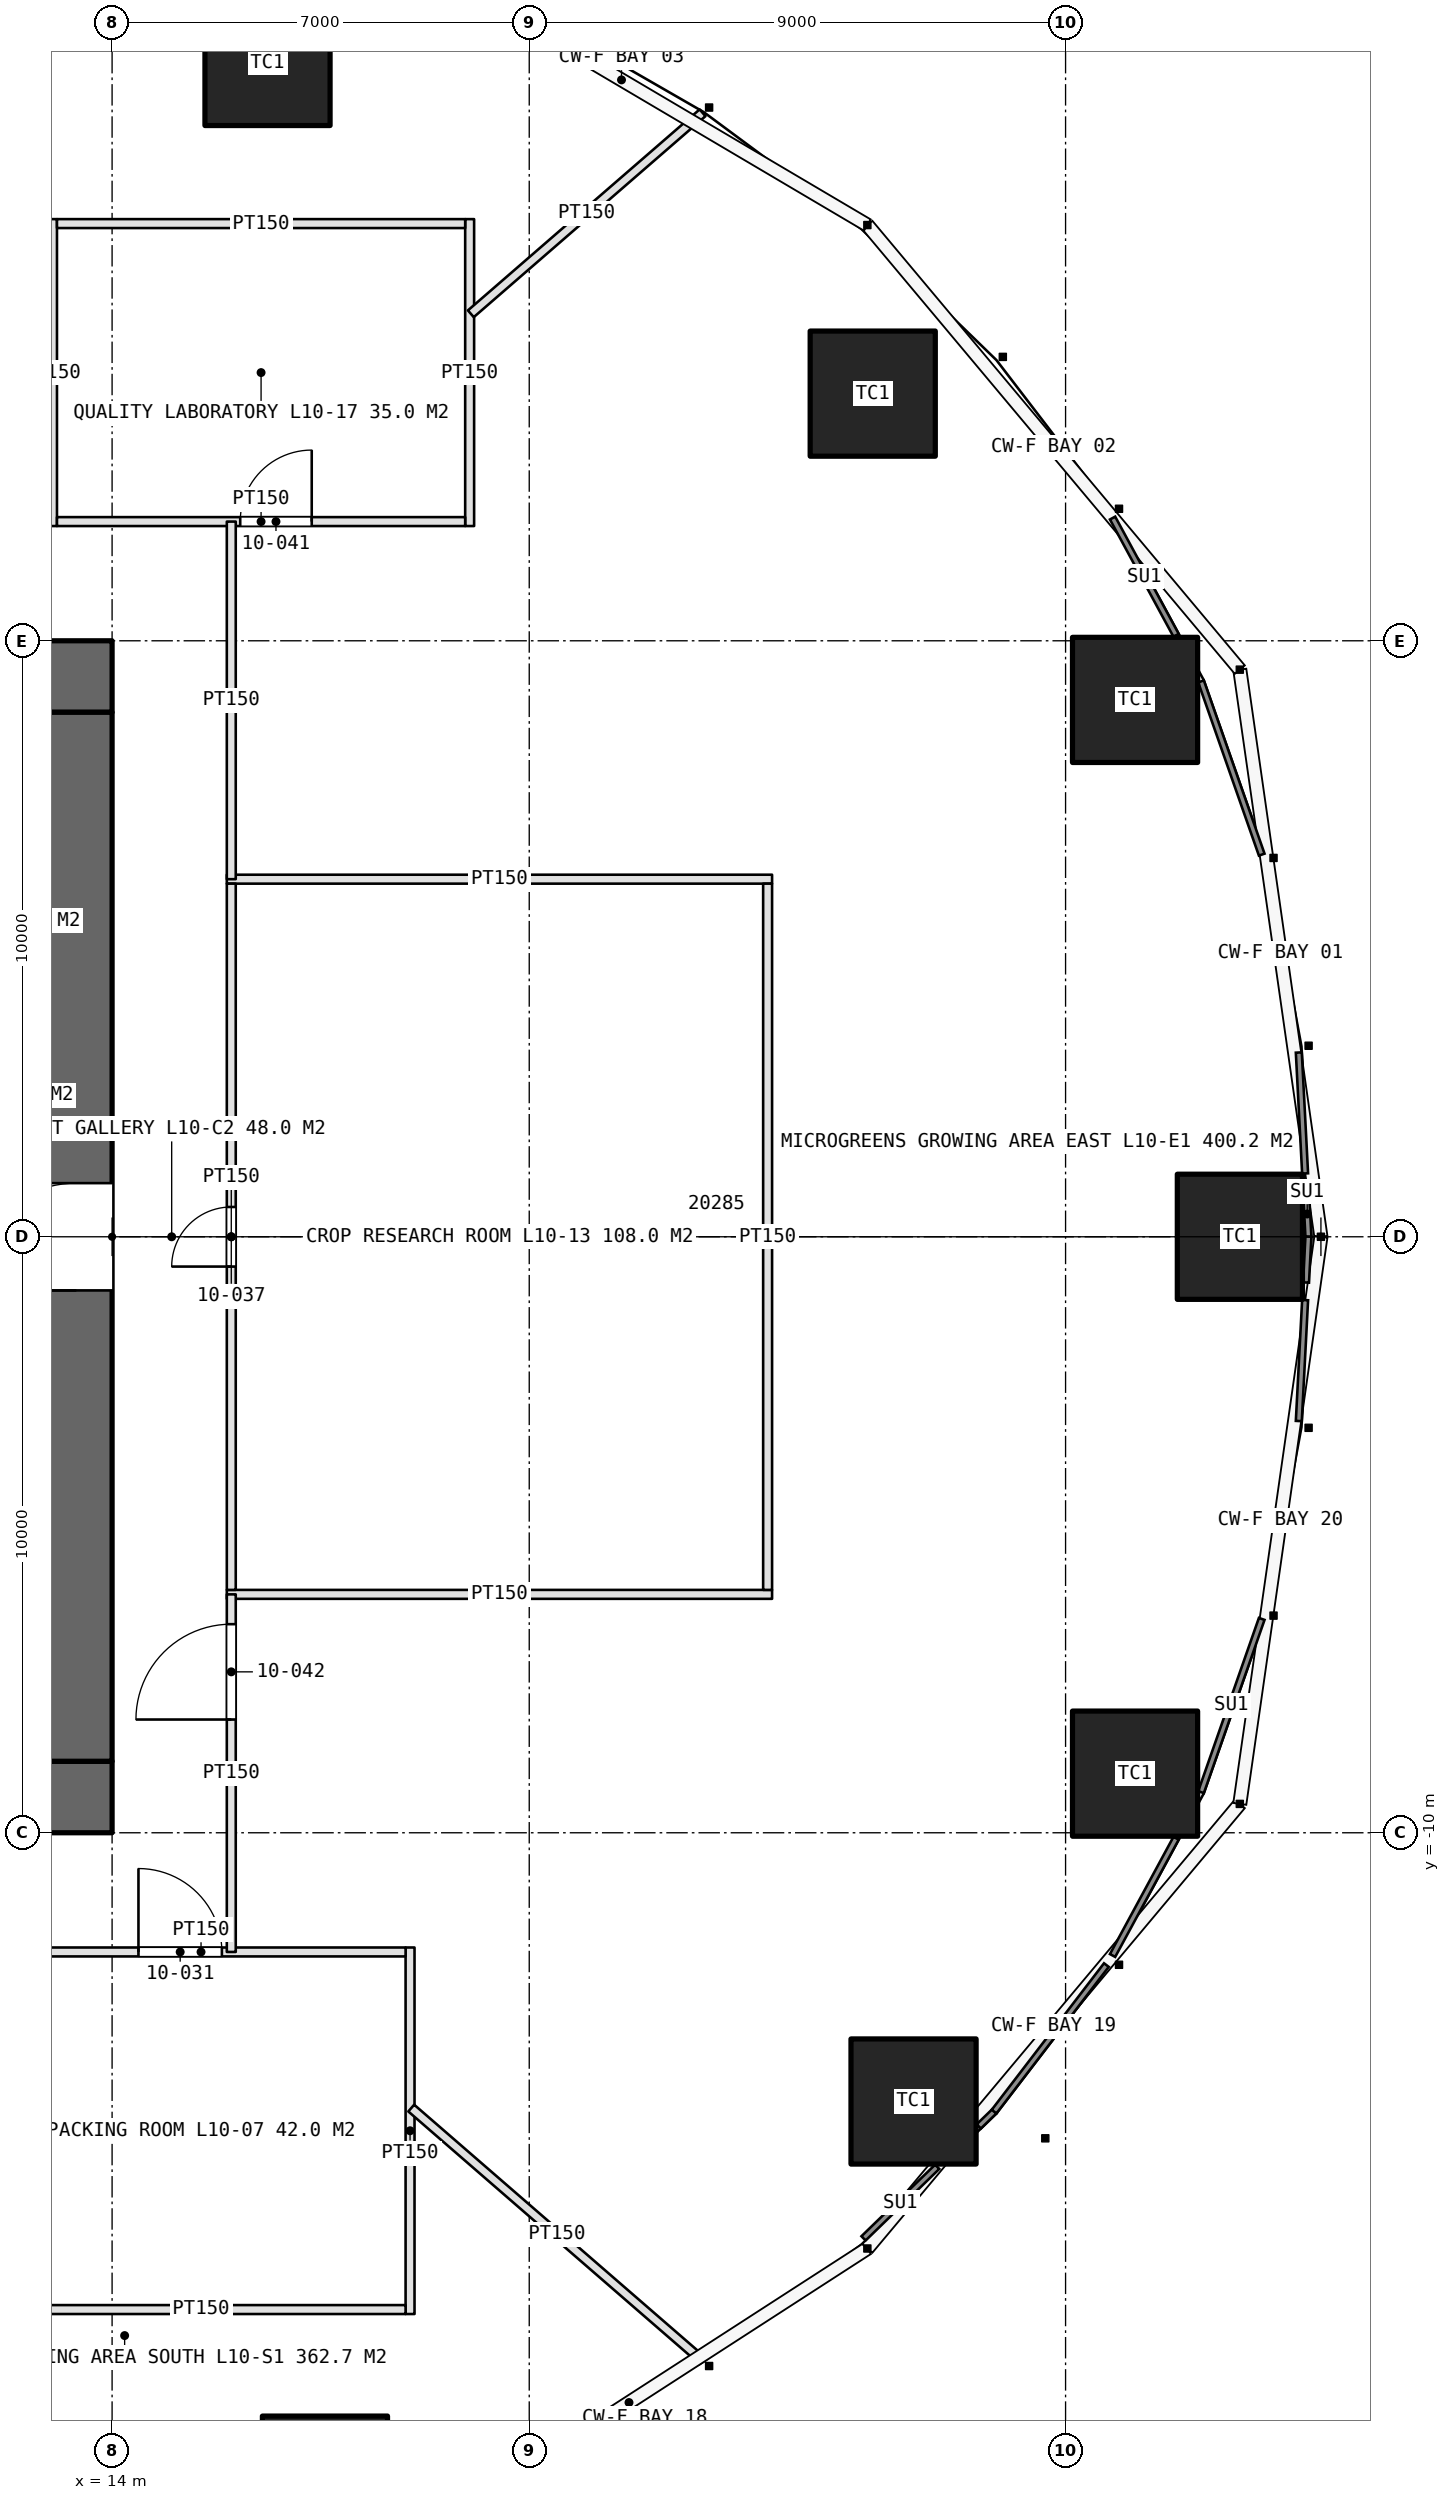
"""IFC4 building model, lengths in metres.
Left out: names, types, materials, properties, quantities, classifications, styles, units other than length and angle.
Written with IfcOpenShell. Run it as: python <this file> out.ifc"""

import sys

from ifc_helpers import new_model, si_unit, direction, frame, frame_2d, origin, origin_2d, place, context, subcontext, project, spatial, rectangle, extrude, element, fill, save


model = new_model("IFC4")
c1 = context("Model", 3, precision=1e-05, world=origin(), true_north=direction((0.0, 1.0)))
c2 = subcontext(c1, "Body", "Model", "MODEL_VIEW")
j1 = project(units=[si_unit("LENGTHUNIT", "METRE"), si_unit("PLANEANGLEUNIT", "RADIAN")], contexts=[c1])
p1 = place(None, origin())
s1 = spatial("IfcSite", under=j1, at=p1, CompositionType="ELEMENT")
p2 = place(p1, origin())
s2 = spatial("IfcBuilding", under=s1, at=p2, CompositionType="ELEMENT")
p3 = place(p2, frame((0.0, 0.0, 50.0)))
s3 = spatial("IfcBuildingStorey", under=s2, at=p3, CompositionType="ELEMENT", Elevation=50.0)
p4 = place(p3, frame((-14.0, -9.4, 0.0), z_axis=(0.0, 0.0, 1.0), x_axis=(1.0, 0.0, 0.0)))
e1 = element("IfcWall", 1, at=p4, inside=s3, PredefinedType="SHEAR", context=c2, shape_type="SweptSolid", body=[
    extrude(rectangle(XDim=28.0, YDim=1.2, at=frame_2d((14.0, 0.0))), origin(), (0.0, 0.0, 1.0), 5.0),
])
p5 = place(p4, frame((13.1, 0.0, 0.0)))
e2 = element("IfcOpeningElement", 2, at=p5, cuts=e1, PredefinedType="OPENING", context=c2, shape_type="SweptSolid", body=[
    extrude(rectangle(XDim=1.8, YDim=2.4, at=frame_2d((0.9, 1.2))), frame((0.0, 0.61, 0.0), z_axis=(0.0, -1.0, 0.0), x_axis=(1.0, 0.0, 0.0)), (0.0, 0.0, 1.0), 1.22),
])
p6 = place(p4, frame((22.9, 0.0, 0.0)))
e3 = element("IfcOpeningElement", 3, at=p6, cuts=e1, PredefinedType="OPENING", context=c2, shape_type="SweptSolid", body=[
    extrude(rectangle(XDim=2.2, YDim=2.7, at=frame_2d((1.1, 1.35))), frame((0.0, 0.61, 0.0), z_axis=(0.0, -1.0, 0.0), x_axis=(1.0, 0.0, 0.0)), (0.0, 0.0, 1.0), 1.22),
])
p7 = place(p3, frame((14.0, 9.4, 0.0), z_axis=(0.0, 0.0, 1.0), x_axis=(-1.0, 0.0, 0.0)))
e4 = element("IfcWall", 4, at=p7, inside=s3, PredefinedType="SHEAR", context=c2, shape_type="SweptSolid", body=[
    extrude(rectangle(XDim=28.0, YDim=1.2, at=frame_2d((14.0, 0.0))), origin(), (0.0, 0.0, 1.0), 5.0),
])
p8 = place(p7, frame((24.0, 0.0, 0.0)))
e5 = element("IfcOpeningElement", 5, at=p8, cuts=e4, PredefinedType="OPENING", context=c2, shape_type="SweptSolid", body=[
    extrude(rectangle(XDim=1.0, YDim=2.4, at=frame_2d((0.5, 1.2))), frame((0.0, 0.61, 0.0), z_axis=(0.0, -1.0, 0.0), x_axis=(1.0, 0.0, 0.0)), (0.0, 0.0, 1.0), 1.22),
])
p9 = place(p7, frame((13.1, 0.0, 0.0)))
e6 = element("IfcOpeningElement", 6, at=p9, cuts=e4, PredefinedType="OPENING", context=c2, shape_type="SweptSolid", body=[
    extrude(rectangle(XDim=1.8, YDim=2.4, at=frame_2d((0.9, 1.2))), frame((0.0, 0.61, 0.0), z_axis=(0.0, -1.0, 0.0), x_axis=(1.0, 0.0, 0.0)), (0.0, 0.0, 1.0), 1.22),
])
p10 = place(p3, frame((13.4, -8.8, 0.0), z_axis=(0.0, 0.0, 1.0), x_axis=(0.0, 1.0, 0.0)))
e7 = element("IfcWall", 7, at=p10, inside=s3, PredefinedType="SHEAR", context=c2, shape_type="SweptSolid", body=[
    extrude(rectangle(XDim=17.6, YDim=1.2, at=frame_2d((8.8, 0.0))), origin(), (0.0, 0.0, 1.0), 5.0),
])
p11 = place(p10, frame((7.9, 0.0, 0.0)))
e8 = element("IfcOpeningElement", 8, at=p11, cuts=e7, PredefinedType="OPENING", context=c2, shape_type="SweptSolid", body=[
    extrude(rectangle(XDim=1.8, YDim=2.4, at=frame_2d((0.9, 1.2))), frame((0.0, 0.61, 0.0), z_axis=(0.0, -1.0, 0.0), x_axis=(1.0, 0.0, 0.0)), (0.0, 0.0, 1.0), 1.22),
])
for number, where, z_axis, x_axis in (
    (9, (32.925, 0.0, 0.0), (0.0, 0.0, 1.0), (1.0, 0.0, 0.0)),
    (10, (31.166, 9.008, 0.0), (0.0, 0.0, 1.0), (1.0, 0.0, 0.0)),
    (11, (26.764, 14.147, 0.0), (0.0, 0.0, 1.0), (1.0, 0.0, 0.0)),
    (12, (16.608, 19.695, 0.0), (0.0, 0.0, 1.0), (1.0, 0.0, 0.0)),
    (13, (17.572, -20.837, 0.0), (0.0, 0.0, 1.0), (1.0, 0.0, 0.0)),
    (14, (27.449, -14.509, 0.0), (0.0, 0.0, 1.0), (1.0, 0.0, 0.0)),
    (15, (31.166, -9.008, 0.0), (0.0, 0.0, 1.0), (1.0, 0.0, 0.0)),
):
    element("IfcColumn", number, at=place(p3, frame(where, z_axis=z_axis, x_axis=x_axis)), inside=s3, PredefinedType="COLUMN", context=c2, shape_type="SweptSolid", body=[
        extrude(rectangle(XDim=2.1, YDim=2.1, at=origin_2d()), origin(), (0.0, 0.0, 1.0), 5.0),
    ])
p12 = place(p3, frame((19.0, -11.925, 0.0), z_axis=(0.0, 0.0, 1.0), x_axis=(0.0, -1.0, 0.0)))
e16 = element("IfcWall", 16, at=p12, inside=s3, PredefinedType="PARTITIONING", context=c2, shape_type="SweptSolid", body=[
    extrude(rectangle(XDim=6.15, YDim=0.15, at=frame_2d((3.075, 0.0))), origin(), (0.0, 0.0, 1.0), 3.6),
])
p13 = place(p3, frame((12.06, -12.0, 0.0), z_axis=(0.0, 0.0, 1.0), x_axis=(1.0, 0.0, 0.0)))
e17 = element("IfcWall", 17, at=p13, inside=s3, PredefinedType="PARTITIONING", context=c2, shape_type="SweptSolid", body=[
    extrude(rectangle(XDim=6.865, YDim=0.15, at=frame_2d((3.433, 0.0))), origin(), (0.0, 0.0, 1.0), 3.6),
])
p14 = place(p13, frame((2.383, 0.0, 0.0)))
e18 = element("IfcOpeningElement", 18, at=p14, cuts=e17, PredefinedType="OPENING", context=c2, shape_type="SweptSolid", body=[
    extrude(rectangle(XDim=1.4, YDim=2.4, at=frame_2d((0.7, 1.2))), frame((0.0, 0.085, 0.0), z_axis=(0.0, -1.0, 0.0), x_axis=(1.0, 0.0, 0.0)), (0.0, 0.0, 1.0), 0.17),
])
p15 = place(p3, frame((12.06, -18.0, 0.0), z_axis=(0.0, 0.0, 1.0), x_axis=(1.0, 0.0, 0.0)))
e19 = element("IfcWall", 19, at=p15, inside=s3, PredefinedType="PARTITIONING", context=c2, shape_type="SweptSolid", body=[
    extrude(rectangle(XDim=6.865, YDim=0.15, at=frame_2d((3.433, 0.0))), origin(), (0.0, 0.0, 1.0), 3.6),
])
for number, where, z_axis, x_axis in (
    (20, (15.925, -6.0, 0.0), (0.0, 0.0, 1.0), (1.0, 0.0, 0.0)),
    (21, (15.925, 6.0, 0.0), (0.0, 0.0, 1.0), (1.0, 0.0, 0.0)),
):
    element("IfcWall", number, at=place(p3, frame(where, z_axis=z_axis, x_axis=x_axis)), inside=s3, PredefinedType="PARTITIONING", context=c2, shape_type="SweptSolid", body=[
        extrude(rectangle(XDim=9.15, YDim=0.15, at=frame_2d((4.575, 0.0))), origin(), (0.0, 0.0, 1.0), 3.6),
    ])
p16 = place(p3, frame((16.0, -5.925, 0.0), z_axis=(0.0, 0.0, 1.0), x_axis=(0.0, 1.0, 0.0)))
e22 = element("IfcWall", 22, at=p16, inside=s3, PredefinedType="PARTITIONING", context=c2, shape_type="SweptSolid", body=[
    extrude(rectangle(XDim=11.85, YDim=0.15, at=frame_2d((5.925, 0.0))), origin(), (0.0, 0.0, 1.0), 3.6),
])
p17 = place(p16, frame((5.425, 0.0, 0.0)))
e23 = element("IfcOpeningElement", 23, at=p17, cuts=e22, PredefinedType="OPENING", context=c2, shape_type="SweptSolid", body=[
    extrude(rectangle(XDim=1.0, YDim=2.2, at=frame_2d((0.5, 1.1))), frame((0.0, 0.085, 0.0), z_axis=(0.0, -1.0, 0.0), x_axis=(1.0, 0.0, 0.0)), (0.0, 0.0, 1.0), 0.17),
])
p18 = place(p3, frame((25.0, -5.925, 0.0), z_axis=(0.0, 0.0, 1.0), x_axis=(0.0, 1.0, 0.0)))
e24 = element("IfcWall", 24, at=p18, inside=s3, PredefinedType="PARTITIONING", context=c2, shape_type="SweptSolid", body=[
    extrude(rectangle(XDim=11.85, YDim=0.15, at=frame_2d((5.925, 0.0))), origin(), (0.0, 0.0, 1.0), 3.6),
])
for number, where, z_axis, x_axis in (
    (25, (13.0, 11.925, 0.0), (0.0, 0.0, 1.0), (0.0, 1.0, 0.0)),
    (26, (20.0, 11.925, 0.0), (0.0, 0.0, 1.0), (0.0, 1.0, 0.0)),
):
    element("IfcWall", number, at=place(p3, frame(where, z_axis=z_axis, x_axis=x_axis)), inside=s3, PredefinedType="PARTITIONING", context=c2, shape_type="SweptSolid", body=[
        extrude(rectangle(XDim=5.15, YDim=0.15, at=frame_2d((2.575, 0.0))), origin(), (0.0, 0.0, 1.0), 3.6),
    ])
p19 = place(p3, frame((13.075, 12.0, 0.0), z_axis=(0.0, 0.0, 1.0), x_axis=(1.0, 0.0, 0.0)))
e27 = element("IfcWall", 27, at=p19, inside=s3, PredefinedType="PARTITIONING", context=c2, shape_type="SweptSolid", body=[
    extrude(rectangle(XDim=6.85, YDim=0.15, at=frame_2d((3.425, 0.0))), origin(), (0.0, 0.0, 1.0), 3.6),
])
p20 = place(p19, frame((3.075, 0.0, 0.0)))
e28 = element("IfcOpeningElement", 28, at=p20, cuts=e27, PredefinedType="OPENING", context=c2, shape_type="SweptSolid", body=[
    extrude(rectangle(XDim=1.2, YDim=2.3, at=frame_2d((0.6, 1.15))), frame((0.0, 0.085, 0.0), z_axis=(0.0, -1.0, 0.0), x_axis=(1.0, 0.0, 0.0)), (0.0, 0.0, 1.0), 0.17),
])
p21 = place(p3, frame((13.075, 17.0, 0.0), z_axis=(0.0, 0.0, 1.0), x_axis=(1.0, 0.0, 0.0)))
e29 = element("IfcWall", 29, at=p21, inside=s3, PredefinedType="PARTITIONING", context=c2, shape_type="SweptSolid", body=[
    extrude(rectangle(XDim=6.85, YDim=0.15, at=frame_2d((3.425, 0.0))), origin(), (0.0, 0.0, 1.0), 3.6),
])
p22 = place(p3, frame((19.02, -14.619, 0.0), z_axis=(0.0, 0.0, 1.0), x_axis=(0.755435065004, -0.65522352107, 0.0)))
e30 = element("IfcWall", 30, at=p22, inside=s3, PredefinedType="PARTITIONING", context=c2, shape_type="SweptSolid", body=[
    extrude(rectangle(XDim=6.471, YDim=0.15, at=frame_2d((3.235, 0.0))), origin(), (0.0, 0.0, 1.0), 3.6),
])
p23 = place(p3, frame((20.02, 15.487, 0.0), z_axis=(0.0, 0.0, 1.0), x_axis=(0.755443308786, 0.655214016342, 0.0)))
e31 = element("IfcWall", 31, at=p23, inside=s3, PredefinedType="PARTITIONING", context=c2, shape_type="SweptSolid", body=[
    extrude(rectangle(XDim=5.147, YDim=0.15, at=frame_2d((2.573, 0.0))), origin(), (0.0, 0.0, 1.0), 3.6),
])
p24 = place(p3, frame((16.0, -12.0, 0.0), z_axis=(0.0, 0.0, 1.0), x_axis=(0.0, 1.0, 0.0)))
e32 = element("IfcWall", 32, at=p24, inside=s3, PredefinedType="PARTITIONING", context=c2, shape_type="SweptSolid", body=[
    extrude(rectangle(XDim=6.0, YDim=0.15, at=frame_2d((3.0, 0.0))), origin(), (0.0, 0.0, 1.0), 3.6),
])
p25 = place(p24, frame((3.9, 0.0, 0.0)))
e33 = element("IfcOpeningElement", 33, at=p25, cuts=e32, PredefinedType="OPENING", context=c2, shape_type="SweptSolid", body=[
    extrude(rectangle(XDim=1.6, YDim=2.4, at=frame_2d((0.8, 1.2))), frame((0.0, 0.085, 0.0), z_axis=(0.0, -1.0, 0.0), x_axis=(1.0, 0.0, 0.0)), (0.0, 0.0, 1.0), 0.17),
])
p26 = place(p3, frame((16.0, 6.0, 0.0), z_axis=(0.0, 0.0, 1.0), x_axis=(0.0, 1.0, 0.0)))
e34 = element("IfcWall", 34, at=p26, inside=s3, PredefinedType="PARTITIONING", context=c2, shape_type="SweptSolid", body=[
    extrude(rectangle(XDim=6.0, YDim=0.15, at=frame_2d((3.0, 0.0))), origin(), (0.0, 0.0, 1.0), 3.6),
])
p27 = place(p11, origin())
e35 = element("IfcDoor", 35, at=p27, inside=s3, OperationType="DOUBLE_DOOR_SINGLE_SWING", PredefinedType="DOOR", context=c2, shape_type="SweptSolid", body=[
    extrude(rectangle(XDim=1.8, YDim=2.4, at=frame_2d((0.9, 1.2))), frame((0.0, 0.025, 0.0), z_axis=(0.0, -1.0, 0.0), x_axis=(1.0, 0.0, 0.0)), (0.0, 0.0, 1.0), 0.05),
])
fill(e8, e35)
p28 = place(p14, origin())
e36 = element("IfcDoor", 36, at=p28, inside=s3, OperationType="DOUBLE_DOOR_DOUBLE_SWING", PredefinedType="DOOR", context=c2, shape_type="SweptSolid", body=[
    extrude(rectangle(XDim=1.4, YDim=2.4, at=frame_2d((0.7, 1.2))), frame((0.0, 0.025, 0.0), z_axis=(0.0, -1.0, 0.0), x_axis=(1.0, 0.0, 0.0)), (0.0, 0.0, 1.0), 0.05),
])
fill(e18, e36)
p29 = place(p17, origin())
e37 = element("IfcDoor", 37, at=p29, inside=s3, OperationType="SINGLE_SWING_LEFT", PredefinedType="DOOR", context=c2, shape_type="SweptSolid", body=[
    extrude(rectangle(XDim=1.0, YDim=2.2, at=frame_2d((0.5, 1.1))), frame((0.0, 0.025, 0.0), z_axis=(0.0, -1.0, 0.0), x_axis=(1.0, 0.0, 0.0)), (0.0, 0.0, 1.0), 0.05),
])
fill(e23, e37)
p30 = place(p20, origin())
e38 = element("IfcDoor", 38, at=p30, inside=s3, OperationType="SINGLE_SWING_RIGHT", PredefinedType="DOOR", context=c2, shape_type="SweptSolid", body=[
    extrude(rectangle(XDim=1.2, YDim=2.3, at=frame_2d((0.6, 1.15))), frame((0.0, 0.025, 0.0), z_axis=(0.0, -1.0, 0.0), x_axis=(1.0, 0.0, 0.0)), (0.0, 0.0, 1.0), 0.05),
])
fill(e28, e38)
p31 = place(p25, origin())
e39 = element("IfcDoor", 39, at=p31, inside=s3, OperationType="DOUBLE_DOOR_SINGLE_SWING", PredefinedType="DOOR", context=c2, shape_type="SweptSolid", body=[
    extrude(rectangle(XDim=1.6, YDim=2.4, at=frame_2d((0.8, 1.2))), frame((0.0, 0.025, 0.0), z_axis=(0.0, -1.0, 0.0), x_axis=(1.0, 0.0, 0.0)), (0.0, 0.0, 1.0), 0.05),
])
fill(e33, e39)
save(model, sys.argv[1])
